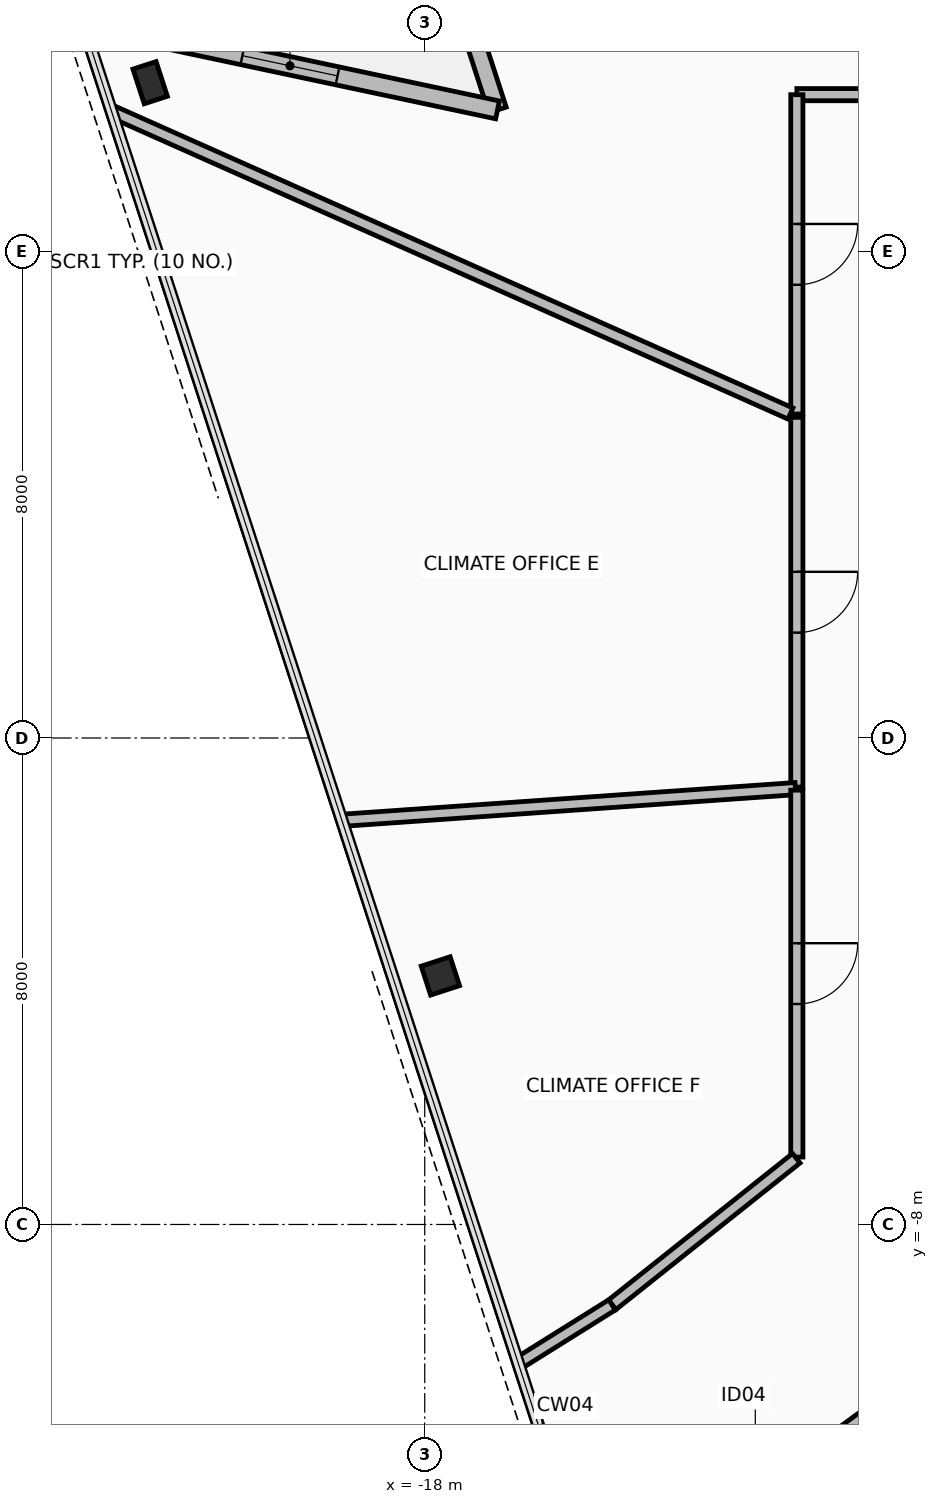
"""IFC4 building model, lengths in metres.
Left out: names, types, materials, properties, quantities, classifications, styles, units other than length and angle.
Written with IfcOpenShell. Run it as: python <this file> out.ifc"""

import sys

from ifc_helpers import new_model, si_unit, direction, frame, frame_2d, origin, origin_2d, place, context, subcontext, project, spatial, rectangle, hollow_rectangle, extrude, element, fill, save


model = new_model("IFC4")
c1 = context("Model", 3, precision=1e-05, world=origin(), true_north=direction((0.0, 1.0)))
c2 = subcontext(c1, "Body", "Model", "MODEL_VIEW")
j1 = project(units=[si_unit("LENGTHUNIT", "METRE"), si_unit("PLANEANGLEUNIT", "RADIAN")], contexts=[c1])
p1 = place(None, origin())
s1 = spatial("IfcSite", under=j1, at=p1, CompositionType="ELEMENT")
p2 = place(p1, origin())
s2 = spatial("IfcBuilding", under=s1, at=p2, CompositionType="ELEMENT")
p3 = place(p2, frame((0.0, 0.0, 214.85)))
s3 = spatial("IfcBuildingStorey", under=s2, at=p3, CompositionType="ELEMENT", Elevation=214.85)
p4 = place(p3, frame((-22.515, 10.777, 0.0), z_axis=(0.0, 0.0, 1.0), x_axis=(-0.309016994375, 0.951056516295, 0.0)))
e1 = element("IfcColumn", 1, at=p4, inside=s3, PredefinedType="COLUMN", context=c2, shape_type="SweptSolid", body=[
    extrude(hollow_rectangle(XDim=0.4, YDim=0.6, WallThickness=0.03, at=origin_2d()), origin(), (0.0, 0.0, 1.0), 3.6),
])
p5 = place(p3, frame((-17.743, -3.913, 0.0), z_axis=(0.0, 0.0, 1.0), x_axis=(-0.309016994375, 0.951056516295, 0.0)))
e2 = element("IfcColumn", 2, at=p5, inside=s3, PredefinedType="COLUMN", context=c2, shape_type="SweptSolid", body=[
    extrude(hollow_rectangle(XDim=0.5, YDim=0.5, WallThickness=0.032, at=origin_2d()), origin(), (0.0, 0.0, 1.0), 3.6),
])
p6 = place(p3, frame((-18.96, 16.968, 0.0), z_axis=(0.0, 0.0, 1.0), x_axis=(0.309030708092, -0.951052060329, 0.0)))
e3 = element("IfcWall", 3, at=p6, inside=s3, PredefinedType="STANDARD", context=c2, shape_type="SweptSolid", body=[
    extrude(rectangle(XDim=6.98, YDim=0.3, at=frame_2d((3.49, 0.0))), origin(), (0.0, 0.0, 1.0), 2.715),
])
p7 = place(p6, frame((3.31, 0.0, 0.0)))
e4 = element("IfcOpeningElement", 4, at=p7, cuts=e3, PredefinedType="OPENING", context=c2, shape_type="SweptSolid", body=[
    extrude(rectangle(XDim=1.1, YDim=2.2, at=frame_2d((0.55, 1.1))), frame((0.0, 0.16, 0.0), z_axis=(0.0, -1.0, 0.0), x_axis=(1.0, 0.0, 0.0)), (0.0, 0.0, 1.0), 0.32),
])
p8 = place(p3, frame((-16.803, 10.329, 0.0), z_axis=(0.0, 0.0, 1.0), x_axis=(-0.9781486268, 0.207906863497, 0.0)))
e5 = element("IfcWall", 5, at=p8, inside=s3, PredefinedType="STANDARD", context=c2, shape_type="SweptSolid", body=[
    extrude(rectangle(XDim=6.98, YDim=0.3, at=frame_2d((3.49, 0.0))), origin(), (0.0, 0.0, 1.0), 2.715),
])
p9 = place(p8, frame((2.69, 0.0, 0.335)))
e6 = element("IfcOpeningElement", 6, at=p9, cuts=e5, PredefinedType="OPENING", context=c2, shape_type="SweptSolid", body=[
    extrude(rectangle(XDim=1.6, YDim=2.2, at=frame_2d((0.8, 1.1))), frame((0.0, 0.16, 0.0), z_axis=(0.0, -1.0, 0.0), x_axis=(1.0, 0.0, 0.0)), (0.0, 0.0, 1.0), 0.32),
])
p10 = place(p3, frame((-8.273, 10.59, 0.0), z_axis=(0.0, 0.0, 1.0), x_axis=(-0.615672850964, 0.788001865851, 0.0)))
e7 = element("IfcWall", 7, at=p10, inside=s3, PredefinedType="PARTITIONING", context=c2, shape_type="SweptSolid", body=[
    extrude(rectangle(XDim=6.249, YDim=0.2, at=frame_2d((3.125, 0.0))), origin(), (0.0, 0.0, 1.0), 2.715),
])
p11 = place(p3, frame((-8.399, 10.58, 0.0), z_axis=(0.0, 0.0, 1.0), x_axis=(-1.0, 0.0, 0.0)))
e8 = element("IfcWall", 8, at=p11, inside=s3, PredefinedType="PARTITIONING", context=c2, shape_type="SweptSolid", body=[
    extrude(rectangle(XDim=3.48, YDim=0.2, at=frame_2d((1.74, 0.0))), origin(), (0.0, 0.0, 1.0), 2.865),
])
p12 = place(p3, frame((-11.88, 10.579, 0.0), z_axis=(0.0, 0.0, 1.0), x_axis=(0.0, -1.0, 0.0)))
e9 = element("IfcWall", 9, at=p12, inside=s3, PredefinedType="PARTITIONING", context=c2, shape_type="SweptSolid", body=[
    extrude(rectangle(XDim=5.251, YDim=0.2, at=frame_2d((2.626, 0.0))), origin(), (0.0, 0.0, 1.0), 2.765),
])
p13 = place(p12, frame((2.126, 0.0, 0.0)))
e10 = element("IfcOpeningElement", 10, at=p13, cuts=e9, PredefinedType="OPENING", context=c2, shape_type="SweptSolid", body=[
    extrude(rectangle(XDim=1.0, YDim=2.15, at=frame_2d((0.5, 1.075))), frame((0.0, 0.11, 0.0), z_axis=(0.0, -1.0, 0.0), x_axis=(1.0, 0.0, 0.0)), (0.0, 0.0, 1.0), 0.22),
])
p14 = place(p3, frame((-11.985, 5.336, 0.0), z_axis=(0.0, 0.0, 1.0), x_axis=(-0.913550027703, 0.406726378397, 0.0)))
e11 = element("IfcWall", 11, at=p14, inside=s3, PredefinedType="PARTITIONING", context=c2, shape_type="SweptSolid", body=[
    extrude(rectangle(XDim=12.212, YDim=0.2, at=frame_2d((6.106, 0.0))), origin(), (0.0, 0.0, 1.0), 2.715),
])
p15 = place(p3, frame((-11.88, 5.273, 0.0), z_axis=(0.0, 0.0, 1.0), x_axis=(0.0, -1.0, 0.0)))
e12 = element("IfcWall", 12, at=p15, inside=s3, PredefinedType="PARTITIONING", context=c2, shape_type="SweptSolid", body=[
    extrude(rectangle(XDim=6.081, YDim=0.2, at=frame_2d((3.04, 0.0))), origin(), (0.0, 0.0, 1.0), 3.42),
])
p16 = place(p15, frame((2.54, 0.0, 0.0)))
e13 = element("IfcOpeningElement", 13, at=p16, cuts=e12, PredefinedType="OPENING", context=c2, shape_type="SweptSolid", body=[
    extrude(rectangle(XDim=1.0, YDim=2.15, at=frame_2d((0.5, 1.075))), frame((0.0, 0.11, 0.0), z_axis=(0.0, -1.0, 0.0), x_axis=(1.0, 0.0, 0.0)), (0.0, 0.0, 1.0), 0.22),
])
p17 = place(p3, frame((-11.903, -0.833, 0.0), z_axis=(0.0, 0.0, 1.0), x_axis=(-0.997566053888, -0.069727814616, 0.0)))
e14 = element("IfcWall", 14, at=p17, inside=s3, PredefinedType="PARTITIONING", context=c2, shape_type="SweptSolid", body=[
    extrude(rectangle(XDim=7.458, YDim=0.2, at=frame_2d((3.729, 0.0))), origin(), (0.0, 0.0, 1.0), 2.715),
])
p18 = place(p3, frame((-11.88, -0.857, 0.0), z_axis=(0.0, 0.0, 1.0), x_axis=(0.0, -1.0, 0.0)))
e15 = element("IfcWall", 15, at=p18, inside=s3, PredefinedType="PARTITIONING", context=c2, shape_type="SweptSolid", body=[
    extrude(rectangle(XDim=6.034, YDim=0.2, at=frame_2d((3.017, 0.0))), origin(), (0.0, 0.0, 1.0), 2.865),
])
p19 = place(p18, frame((2.517, 0.0, 0.0)))
e16 = element("IfcOpeningElement", 16, at=p19, cuts=e15, PredefinedType="OPENING", context=c2, shape_type="SweptSolid", body=[
    extrude(rectangle(XDim=1.0, YDim=2.15, at=frame_2d((0.5, 1.075))), frame((0.0, 0.11, 0.0), z_axis=(0.0, -1.0, 0.0), x_axis=(1.0, 0.0, 0.0)), (0.0, 0.0, 1.0), 0.22),
])
p20 = place(p3, frame((-11.889, -6.911, 0.0), z_axis=(0.0, 0.0, 1.0), x_axis=(-0.782368382049, -0.622815955777, 0.0)))
e17 = element("IfcWall", 17, at=p20, inside=s3, PredefinedType="PARTITIONING", context=c2, shape_type="SweptSolid", body=[
    extrude(rectangle(XDim=3.87, YDim=0.2, at=frame_2d((1.935, 0.0))), origin(), (0.0, 0.0, 1.0), 3.115),
])
p21 = place(p3, frame((-14.919, -9.323, 0.0), z_axis=(0.0, 0.0, 1.0), x_axis=(-0.84803603548, -0.529938564861, 0.0)))
e18 = element("IfcWall", 18, at=p21, inside=s3, PredefinedType="PARTITIONING", context=c2, shape_type="SweptSolid", body=[
    extrude(rectangle(XDim=1.817, YDim=0.2, at=frame_2d((0.909, 0.0))), origin(), (0.0, 0.0, 1.0), 2.715),
])
p22 = place(p3, frame((-15.141, -14.347, 0.0), z_axis=(0.0, 0.0, 1.0), x_axis=(0.807843616105, 0.589396888284, 0.0)))
e19 = element("IfcWall", 19, at=p22, inside=s3, PredefinedType="PARTITIONING", context=c2, shape_type="SweptSolid", body=[
    extrude(rectangle(XDim=6.383, YDim=0.2, at=frame_2d((3.191, 0.0))), origin(), (0.0, 0.0, 1.0), 2.715),
])
p23 = place(p22, frame((2.691, 0.0, 0.0)))
e20 = element("IfcOpeningElement", 20, at=p23, cuts=e19, PredefinedType="OPENING", context=c2, shape_type="SweptSolid", body=[
    extrude(rectangle(XDim=1.0, YDim=2.15, at=frame_2d((0.5, 1.075))), frame((0.0, 0.11, 0.0), z_axis=(0.0, -1.0, 0.0), x_axis=(1.0, 0.0, 0.0)), (0.0, 0.0, 1.0), 0.22),
])
p24 = place(p3, frame((-6.169, -10.685, 0.0), z_axis=(0.0, 0.0, 1.0), x_axis=(-0.500003586584, -0.866023333059, 0.0)))
e21 = element("IfcWall", 21, at=p24, inside=s3, PredefinedType="PARTITIONING", context=c2, shape_type="SweptSolid", body=[
    extrude(rectangle(XDim=13.005, YDim=0.2, at=frame_2d((6.502, 0.0))), origin(), (0.0, 0.0, 1.0), 2.715),
])
p25 = place(p9, origin())
e22 = element("IfcWindow", 22, at=p25, inside=s3, PartitioningType="SINGLE_PANEL", PredefinedType="WINDOW", context=c2, shape_type="SweptSolid", body=[
    extrude(rectangle(XDim=1.6, YDim=2.2, at=frame_2d((0.8, 1.1))), frame((0.0, 0.03, 0.0), z_axis=(0.0, -1.0, 0.0), x_axis=(1.0, 0.0, 0.0)), (0.0, 0.0, 1.0), 0.06),
])
fill(e6, e22)
p26 = place(p13, origin())
e23 = element("IfcDoor", 23, at=p26, inside=s3, OperationType="SINGLE_SWING_RIGHT", PredefinedType="DOOR", context=c2, shape_type="SweptSolid", body=[
    extrude(rectangle(XDim=1.0, YDim=2.15, at=frame_2d((0.5, 1.075))), frame((0.0, 0.025, 0.0), z_axis=(0.0, -1.0, 0.0), x_axis=(1.0, 0.0, 0.0)), (0.0, 0.0, 1.0), 0.05),
])
fill(e10, e23)
p27 = place(p16, origin())
e24 = element("IfcDoor", 24, at=p27, inside=s3, OperationType="SINGLE_SWING_RIGHT", PredefinedType="DOOR", context=c2, shape_type="SweptSolid", body=[
    extrude(rectangle(XDim=1.0, YDim=2.15, at=frame_2d((0.5, 1.075))), frame((0.0, 0.025, 0.0), z_axis=(0.0, -1.0, 0.0), x_axis=(1.0, 0.0, 0.0)), (0.0, 0.0, 1.0), 0.05),
])
fill(e13, e24)
p28 = place(p19, origin())
e25 = element("IfcDoor", 25, at=p28, inside=s3, OperationType="SINGLE_SWING_RIGHT", PredefinedType="DOOR", context=c2, shape_type="SweptSolid", body=[
    extrude(rectangle(XDim=1.0, YDim=2.15, at=frame_2d((0.5, 1.075))), frame((0.0, 0.025, 0.0), z_axis=(0.0, -1.0, 0.0), x_axis=(1.0, 0.0, 0.0)), (0.0, 0.0, 1.0), 0.05),
])
fill(e16, e25)
save(model, sys.argv[1])
